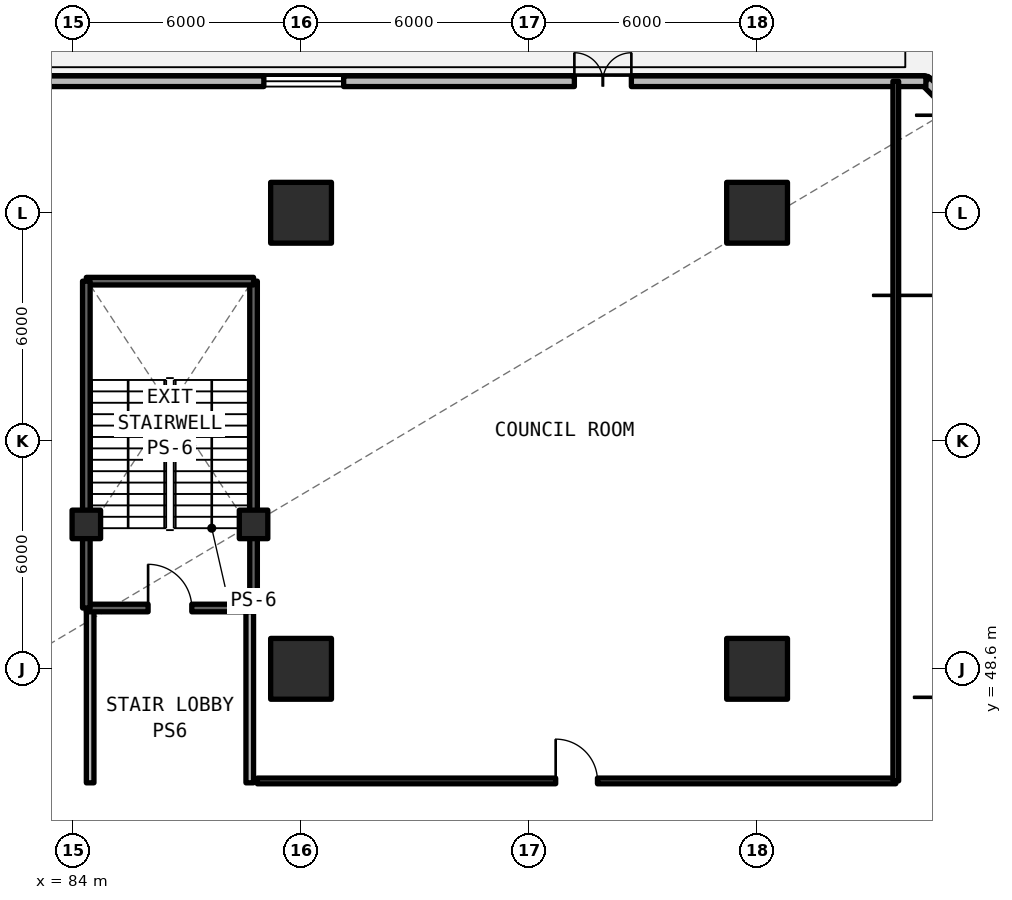
"""IFC4 building model, lengths in metres.
Left out: names, types, materials, properties, quantities, classifications, styles, units other than length and angle.
Written with IfcOpenShell. Run it as: python <this file> out.ifc"""

import sys

from ifc_helpers import new_model, si_unit, direction, frame, frame_2d, origin, origin_2d, place, context, subcontext, project, spatial, rectangle, extrude, element, fill, save


model = new_model("IFC4")
c1 = context("Model", 3, precision=1e-05, world=origin(), true_north=direction((0.0, 1.0)))
c2 = subcontext(c1, "Body", "Model", "MODEL_VIEW")
j1 = project(units=[si_unit("LENGTHUNIT", "METRE"), si_unit("PLANEANGLEUNIT", "RADIAN")], contexts=[c1])
p1 = place(None, origin())
s1 = spatial("IfcSite", under=j1, at=p1, CompositionType="ELEMENT")
p2 = place(p1, origin())
s2 = spatial("IfcBuilding", under=s1, at=p2, CompositionType="ELEMENT")
p3 = place(p2, frame((0.0, 0.0, 14.85)))
s3 = spatial("IfcBuildingStorey", under=s2, at=p3, CompositionType="ELEMENT", Elevation=14.85)
for number, where, z_axis, x_axis in (
    (1, (90.0, 60.6, 0.0), (0.0, 0.0, 1.0), (1.0, 0.0, 0.0)),
    (2, (102.0, 60.6, 0.0), (0.0, 0.0, 1.0), (1.0, 0.0, 0.0)),
    (3, (90.0, 48.6, 0.0), (0.0, 0.0, 1.0), (1.0, 0.0, 0.0)),
    (4, (102.0, 48.6, 0.0), (0.0, 0.0, 1.0), (1.0, 0.0, 0.0)),
):
    element("IfcColumn", number, at=place(p3, frame(where, z_axis=z_axis, x_axis=x_axis)), inside=s3, PredefinedType="COLUMN", context=c2, shape_type="SweptSolid", body=[
        extrude(rectangle(XDim=1.6, YDim=1.6, at=origin_2d()), origin(), (0.0, 0.0, 1.0), 4.62),
    ])
for number, where, z_axis, x_axis in (
    (5, (84.35, 52.4, 0.0), (0.0, 0.0, 1.0), (1.0, 0.0, 0.0)),
    (6, (88.75, 52.4, 0.0), (0.0, 0.0, 1.0), (1.0, 0.0, 0.0)),
):
    element("IfcColumn", number, at=place(p3, frame(where, z_axis=z_axis, x_axis=x_axis)), inside=s3, PredefinedType="COLUMN", context=c2, shape_type="SweptSolid", body=[
        extrude(rectangle(XDim=0.75, YDim=0.75, at=origin_2d()), origin(), (0.0, 0.0, 1.0), 4.62),
    ])
p4 = place(p3, frame((108.46, 62.042, 0.0), z_axis=(0.0, 0.0, 1.0), x_axis=(-0.707106781187, 0.707106781187, 0.0)))
e7 = element("IfcWall", 7, at=p4, inside=s3, PredefinedType="SOLIDWALL", context=c2, shape_type="SweptSolid", body=[
    extrude(rectangle(XDim=2.854, YDim=0.28, at=frame_2d((1.427, 0.0))), origin(), (0.0, 0.0, 1.0), 4.34),
])
p5 = place(p4, frame((0.727, 0.0, 0.78)))
e8 = element("IfcOpeningElement", 8, at=p5, cuts=e7, PredefinedType="OPENING", context=c2, shape_type="SweptSolid", body=[
    extrude(rectangle(XDim=1.4, YDim=1.65, at=frame_2d((0.7, 0.825))), frame((0.0, 0.15, 0.0), z_axis=(0.0, -1.0, 0.0), x_axis=(1.0, 0.0, 0.0)), (0.0, 0.0, 1.0), 0.3),
])
p6 = place(p3, frame((106.442, 64.06, 0.0), z_axis=(0.0, 0.0, 1.0), x_axis=(-1.0, 0.0, 0.0)))
e9 = element("IfcWall", 9, at=p6, inside=s3, PredefinedType="SOLIDWALL", context=c2, shape_type="SweptSolid", body=[
    extrude(rectangle(XDim=42.242, YDim=0.28, at=frame_2d((21.121, 0.0))), origin(), (0.0, 0.0, 1.0), 4.34),
])
p7 = place(p6, frame((7.75, 0.0, 0.0)))
e10 = element("IfcOpeningElement", 10, at=p7, cuts=e9, PredefinedType="OPENING", context=c2, shape_type="SweptSolid", body=[
    extrude(rectangle(XDim=1.5, YDim=2.2, at=frame_2d((0.75, 1.1))), frame((0.0, 0.15, 0.0), z_axis=(0.0, -1.0, 0.0), x_axis=(1.0, 0.0, 0.0)), (0.0, 0.0, 1.0), 0.3),
])
p8 = place(p6, frame((40.817, 0.0, 0.78)))
e11 = element("IfcOpeningElement", 11, at=p8, cuts=e9, PredefinedType="OPENING", context=c2, shape_type="SweptSolid", body=[
    extrude(rectangle(XDim=0.85, YDim=1.65, at=frame_2d((0.425, 0.825))), frame((0.0, 0.15, 0.0), z_axis=(0.0, -1.0, 0.0), x_axis=(1.0, 0.0, 0.0)), (0.0, 0.0, 1.0), 0.3),
])
p9 = place(p6, frame((15.321, 0.0, 0.78)))
e12 = element("IfcOpeningElement", 12, at=p9, cuts=e9, PredefinedType="OPENING", context=c2, shape_type="SweptSolid", body=[
    extrude(rectangle(XDim=2.1, YDim=1.66, at=frame_2d((1.05, 0.83))), frame((0.0, 0.15, 0.0), z_axis=(0.0, -1.0, 0.0), x_axis=(1.0, 0.0, 0.0)), (0.0, 0.0, 1.0), 0.3),
])
p10 = place(p6, frame((24.821, 0.0, 0.78)))
e13 = element("IfcOpeningElement", 13, at=p10, cuts=e9, PredefinedType="OPENING", context=c2, shape_type="SweptSolid", body=[
    extrude(rectangle(XDim=2.1, YDim=1.66, at=frame_2d((1.05, 0.83))), frame((0.0, 0.15, 0.0), z_axis=(0.0, -1.0, 0.0), x_axis=(1.0, 0.0, 0.0)), (0.0, 0.0, 1.0), 0.3),
])
p11 = place(p6, frame((34.321, 0.0, 0.78)))
e14 = element("IfcOpeningElement", 14, at=p11, cuts=e9, PredefinedType="OPENING", context=c2, shape_type="SweptSolid", body=[
    extrude(rectangle(XDim=2.1, YDim=1.66, at=frame_2d((1.05, 0.83))), frame((0.0, 0.15, 0.0), z_axis=(0.0, -1.0, 0.0), x_axis=(1.0, 0.0, 0.0)), (0.0, 0.0, 1.0), 0.3),
])
for number, where, z_axis, x_axis in (
    (15, (84.45, 45.6, 0.0), (0.0, 0.0, 1.0), (0.0, 1.0, 0.0)),
    (16, (88.65, 45.6, 0.0), (0.0, 0.0, 1.0), (0.0, 1.0, 0.0)),
):
    element("IfcWall", number, at=place(p3, frame(where, z_axis=z_axis, x_axis=x_axis)), inside=s3, PredefinedType="SOLIDWALL", context=c2, shape_type="SweptSolid", body=[
        extrude(rectangle(XDim=4.6, YDim=0.2, at=frame_2d((2.3, 0.0))), origin(), (0.0, 0.0, 1.0), 3.56),
    ])
p12 = place(p3, frame((88.85, 45.65, 0.0), z_axis=(0.0, 0.0, 1.0), x_axis=(1.0, 0.0, 0.0)))
e17 = element("IfcWall", 17, at=p12, inside=s3, PredefinedType="SOLIDWALL", context=c2, shape_type="SweptSolid", body=[
    extrude(rectangle(XDim=16.8, YDim=0.15, at=frame_2d((8.4, 0.0))), origin(), (0.0, 0.0, 1.0), 3.56),
])
p13 = place(p12, frame((7.85, 0.0, 0.0)))
e18 = element("IfcOpeningElement", 18, at=p13, cuts=e17, PredefinedType="OPENING", context=c2, shape_type="SweptSolid", body=[
    extrude(rectangle(XDim=1.1, YDim=2.15, at=frame_2d((0.55, 1.075))), frame((0.0, 0.085, 0.0), z_axis=(0.0, -1.0, 0.0), x_axis=(1.0, 0.0, 0.0)), (0.0, 0.0, 1.0), 0.17),
])
p14 = place(p3, frame((105.65, 45.65, 0.0), z_axis=(0.0, 0.0, 1.0), x_axis=(0.0, 1.0, 0.0)))
e19 = element("IfcWall", 19, at=p14, inside=s3, PredefinedType="SOLIDWALL", context=c2, shape_type="SweptSolid", body=[
    extrude(rectangle(XDim=18.41, YDim=0.15, at=frame_2d((9.205, 0.0))), origin(), (0.0, 0.0, 1.0), 3.56),
])
p15 = place(p3, frame((84.35, 50.2, 0.0), z_axis=(0.0, 0.0, 1.0), x_axis=(1.0, 0.0, 0.0)))
e20 = element("IfcWall", 20, at=p15, inside=s3, PredefinedType="SOLIDWALL", context=c2, shape_type="SweptSolid", body=[
    extrude(rectangle(XDim=4.4, YDim=0.2, at=frame_2d((2.2, 0.0))), origin(), (0.0, 0.0, 1.0), 4.62),
])
p16 = place(p15, frame((1.625, 0.0, 0.0)))
e21 = element("IfcOpeningElement", 21, at=p16, cuts=e20, PredefinedType="OPENING", context=c2, shape_type="SweptSolid", body=[
    extrude(rectangle(XDim=1.15, YDim=2.15, at=frame_2d((0.575, 1.075))), frame((0.0, 0.11, 0.0), z_axis=(0.0, -1.0, 0.0), x_axis=(1.0, 0.0, 0.0)), (0.0, 0.0, 1.0), 0.22),
])
p17 = place(p3, frame((88.75, 50.2, 0.0), z_axis=(0.0, 0.0, 1.0), x_axis=(0.0, 1.0, 0.0)))
e22 = element("IfcWall", 22, at=p17, inside=s3, PredefinedType="SOLIDWALL", context=c2, shape_type="SweptSolid", body=[
    extrude(rectangle(XDim=8.6, YDim=0.2, at=frame_2d((4.3, 0.0))), origin(), (0.0, 0.0, 1.0), 4.62),
])
p18 = place(p3, frame((88.75, 58.8, 0.0), z_axis=(0.0, 0.0, 1.0), x_axis=(-1.0, 0.0, 0.0)))
e23 = element("IfcWall", 23, at=p18, inside=s3, PredefinedType="SOLIDWALL", context=c2, shape_type="SweptSolid", body=[
    extrude(rectangle(XDim=4.4, YDim=0.2, at=frame_2d((2.2, 0.0))), origin(), (0.0, 0.0, 1.0), 4.62),
])
p19 = place(p3, frame((84.35, 58.8, 0.0), z_axis=(0.0, 0.0, 1.0), x_axis=(0.0, -1.0, 0.0)))
e24 = element("IfcWall", 24, at=p19, inside=s3, PredefinedType="SOLIDWALL", context=c2, shape_type="SweptSolid", body=[
    extrude(rectangle(XDim=8.6, YDim=0.2, at=frame_2d((4.3, 0.0))), origin(), (0.0, 0.0, 1.0), 4.62),
])
p20 = place(p7, frame((1.5, 0.0, 0.0), z_axis=(0.0, 0.0, 1.0), x_axis=(-1.0, 0.0, 0.0)))
e25 = element("IfcDoor", 25, at=p20, inside=s3, OperationType="SINGLE_SWING_LEFT", PredefinedType="DOOR", context=c2, shape_type="SweptSolid", body=[
    extrude(rectangle(XDim=1.5, YDim=2.2, at=frame_2d((0.75, 1.1))), frame((0.0, 0.025, 0.0), z_axis=(0.0, -1.0, 0.0), x_axis=(1.0, 0.0, 0.0)), (0.0, 0.0, 1.0), 0.05),
])
fill(e10, e25)
p21 = place(p9, origin())
e26 = element("IfcWindow", 26, at=p21, inside=s3, PartitioningType="SINGLE_PANEL", PredefinedType="WINDOW", context=c2, shape_type="SweptSolid", body=[
    extrude(rectangle(XDim=2.1, YDim=1.66, at=frame_2d((1.05, 0.83))), frame((0.0, 0.03, 0.0), z_axis=(0.0, -1.0, 0.0), x_axis=(1.0, 0.0, 0.0)), (0.0, 0.0, 1.0), 0.06),
])
fill(e12, e26)
p22 = place(p13, origin())
e27 = element("IfcDoor", 27, at=p22, inside=s3, OperationType="SINGLE_SWING_LEFT", PredefinedType="DOOR", context=c2, shape_type="SweptSolid", body=[
    extrude(rectangle(XDim=1.1, YDim=2.15, at=frame_2d((0.55, 1.075))), frame((0.0, 0.025, 0.0), z_axis=(0.0, -1.0, 0.0), x_axis=(1.0, 0.0, 0.0)), (0.0, 0.0, 1.0), 0.05),
])
fill(e18, e27)
p23 = place(p16, origin())
e28 = element("IfcDoor", 28, at=p23, inside=s3, OperationType="SINGLE_SWING_LEFT", PredefinedType="DOOR", context=c2, shape_type="SweptSolid", body=[
    extrude(rectangle(XDim=1.15, YDim=2.15, at=frame_2d((0.575, 1.075))), frame((0.0, 0.025, 0.0), z_axis=(0.0, -1.0, 0.0), x_axis=(1.0, 0.0, 0.0)), (0.0, 0.0, 1.0), 0.05),
])
fill(e21, e28)
save(model, sys.argv[1])
